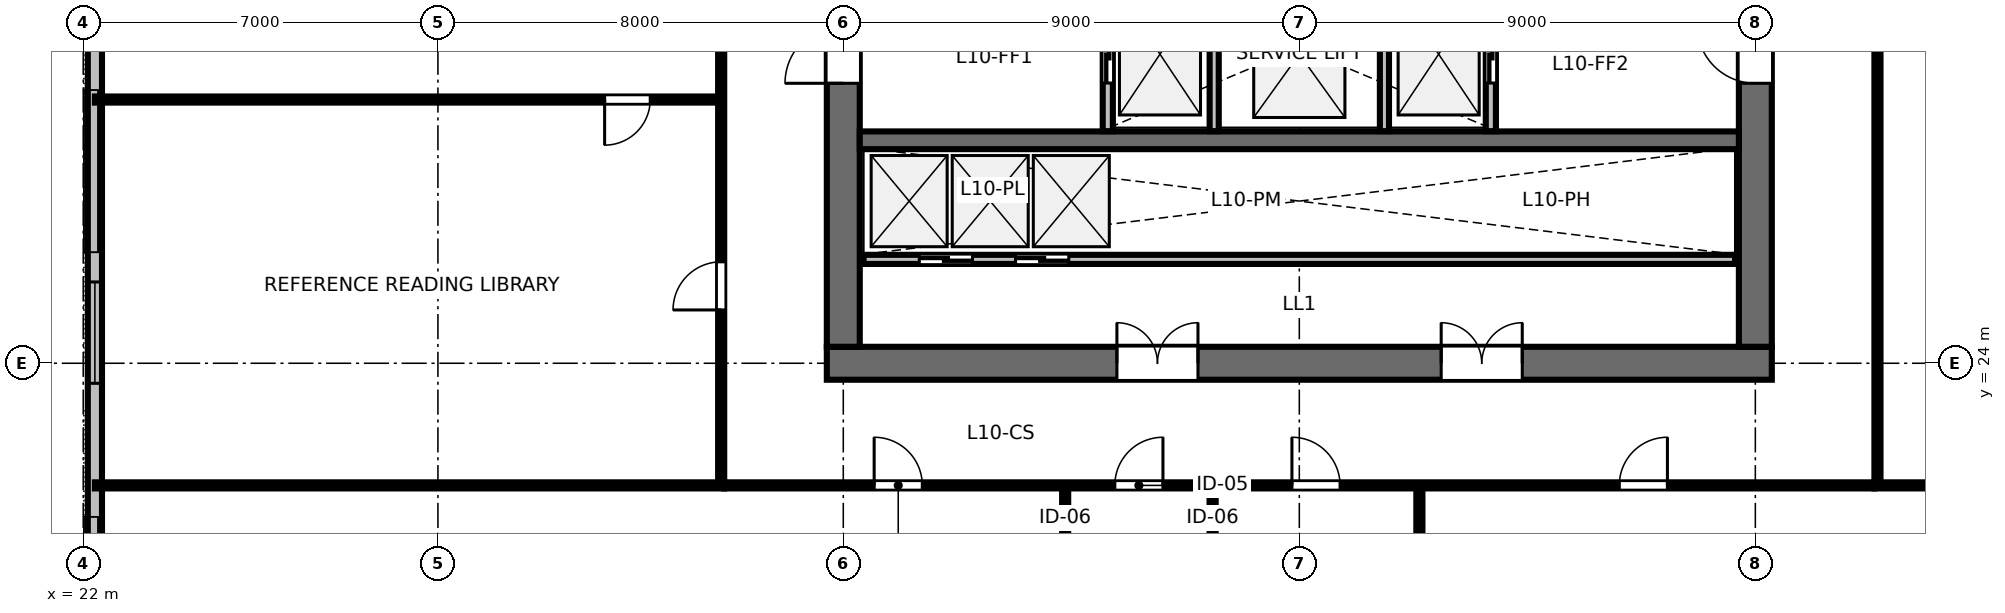
"""IFC4 building model, lengths in metres.
Left out: names, types, materials, properties, quantities, classifications, styles, units other than length and angle.
Written with IfcOpenShell. Run it as: python <this file> out.ifc"""

import sys

from ifc_helpers import new_model, si_unit, direction, frame, frame_2d, origin, place, context, subcontext, project, spatial, rectangle, extrude, element, fill, save


model = new_model("IFC4")
c1 = context("Model", 3, precision=1e-05, world=origin(), true_north=direction((0.0, 1.0)))
c2 = subcontext(c1, "Body", "Model", "MODEL_VIEW")
j1 = project(units=[si_unit("LENGTHUNIT", "METRE"), si_unit("PLANEANGLEUNIT", "RADIAN")], contexts=[c1])
p1 = place(None, origin())
s1 = spatial("IfcSite", under=j1, at=p1, CompositionType="ELEMENT")
p2 = place(p1, origin())
s2 = spatial("IfcBuilding", under=s1, at=p2, CompositionType="ELEMENT")
p3 = place(p2, frame((0.0, 0.0, 42.4)))
s3 = spatial("IfcBuildingStorey", under=s2, at=p3, CompositionType="ELEMENT", Elevation=42.4)
p4 = place(p3, frame((36.675, 24.0, 0.0), z_axis=(0.0, 0.0, 1.0), x_axis=(1.0, 0.0, 0.0)))
e1 = element("IfcWall", 1, at=p4, inside=s3, PredefinedType="SHEAR", context=c2, shape_type="SweptSolid", body=[
    extrude(rectangle(XDim=18.65, YDim=0.65, at=frame_2d((9.325, 0.0))), origin(), (0.0, 0.0, 1.0), 3.36),
])
p5 = place(p4, frame((5.725, 0.0, 0.0)))
e2 = element("IfcOpeningElement", 2, at=p5, cuts=e1, PredefinedType="OPENING", context=c2, shape_type="SweptSolid", body=[
    extrude(rectangle(XDim=1.6, YDim=2.15, at=frame_2d((0.8, 1.075))), frame((0.0, 0.335, 0.0), z_axis=(0.0, -1.0, 0.0), x_axis=(1.0, 0.0, 0.0)), (0.0, 0.0, 1.0), 0.67),
])
p6 = place(p4, frame((12.125, 0.0, 0.0)))
e3 = element("IfcOpeningElement", 3, at=p6, cuts=e1, PredefinedType="OPENING", context=c2, shape_type="SweptSolid", body=[
    extrude(rectangle(XDim=1.6, YDim=2.15, at=frame_2d((0.8, 1.075))), frame((0.0, 0.335, 0.0), z_axis=(0.0, -1.0, 0.0), x_axis=(1.0, 0.0, 0.0)), (0.0, 0.0, 1.0), 0.67),
])
p7 = place(p3, frame((37.0, 24.325, 0.0), z_axis=(0.0, 0.0, 1.0), x_axis=(0.0, 1.0, 0.0)))
e4 = element("IfcWall", 4, at=p7, inside=s3, PredefinedType="SHEAR", context=c2, shape_type="SweptSolid", body=[
    extrude(rectangle(XDim=15.35, YDim=0.65, at=frame_2d((7.675, 0.0))), origin(), (0.0, 0.0, 1.0), 3.36),
])
p8 = place(p7, frame((5.2, 0.0, 0.0)))
e5 = element("IfcOpeningElement", 5, at=p8, cuts=e4, PredefinedType="OPENING", context=c2, shape_type="SweptSolid", body=[
    extrude(rectangle(XDim=1.15, YDim=2.15, at=frame_2d((0.575, 1.075))), frame((0.0, 0.335, 0.0), z_axis=(0.0, -1.0, 0.0), x_axis=(1.0, 0.0, 0.0)), (0.0, 0.0, 1.0), 0.67),
])
p9 = place(p3, frame((55.0, 24.325, 0.0), z_axis=(0.0, 0.0, 1.0), x_axis=(0.0, 1.0, 0.0)))
e6 = element("IfcWall", 6, at=p9, inside=s3, PredefinedType="SHEAR", context=c2, shape_type="SweptSolid", body=[
    extrude(rectangle(XDim=15.35, YDim=0.65, at=frame_2d((7.675, 0.0))), origin(), (0.0, 0.0, 1.0), 3.36),
])
p10 = place(p9, frame((5.2, 0.0, 0.0)))
e7 = element("IfcOpeningElement", 7, at=p10, cuts=e6, PredefinedType="OPENING", context=c2, shape_type="SweptSolid", body=[
    extrude(rectangle(XDim=1.15, YDim=2.15, at=frame_2d((0.575, 1.075))), frame((0.0, 0.335, 0.0), z_axis=(0.0, -1.0, 0.0), x_axis=(1.0, 0.0, 0.0)), (0.0, 0.0, 1.0), 0.67),
])
p11 = place(p3, frame((37.325, 28.4, 0.0), z_axis=(0.0, 0.0, 1.0), x_axis=(1.0, 0.0, 0.0)))
e8 = element("IfcWall", 8, at=p11, inside=s3, PredefinedType="SHEAR", context=c2, shape_type="SweptSolid", body=[
    extrude(rectangle(XDim=17.35, YDim=0.35, at=frame_2d((8.675, 0.0))), origin(), (0.0, 0.0, 1.0), 3.36),
])
p12 = place(p3, frame((22.23, 49.74, 0.0), z_axis=(0.0, 0.0, 1.0), x_axis=(0.0, -1.0, 0.0)))
e9 = element("IfcWall", 9, at=p12, inside=s3, PredefinedType="STANDARD", context=c2, shape_type="SweptSolid", body=[
    extrude(rectangle(XDim=35.48, YDim=0.28, at=frame_2d((17.74, 0.0))), origin(), (0.0, 0.0, 1.0), 3.15),
])
p13 = place(p12, frame((1.949, 0.0, 0.8)))
e10 = element("IfcOpeningElement", 10, at=p13, cuts=e9, PredefinedType="OPENING", context=c2, shape_type="SweptSolid", body=[
    extrude(rectangle(XDim=2.0, YDim=1.95, at=frame_2d((1.0, 0.975))), frame((0.0, 0.15, 0.0), z_axis=(0.0, -1.0, 0.0), x_axis=(1.0, 0.0, 0.0)), (0.0, 0.0, 1.0), 0.3),
])
p14 = place(p12, frame((9.344, 0.0, 0.8)))
e11 = element("IfcOpeningElement", 11, at=p14, cuts=e9, PredefinedType="OPENING", context=c2, shape_type="SweptSolid", body=[
    extrude(rectangle(XDim=2.0, YDim=1.95, at=frame_2d((1.0, 0.975))), frame((0.0, 0.15, 0.0), z_axis=(0.0, -1.0, 0.0), x_axis=(1.0, 0.0, 0.0)), (0.0, 0.0, 1.0), 0.3),
])
p15 = place(p12, frame((24.135, 0.0, 0.8)))
e12 = element("IfcOpeningElement", 12, at=p15, cuts=e9, PredefinedType="OPENING", context=c2, shape_type="SweptSolid", body=[
    extrude(rectangle(XDim=2.0, YDim=1.95, at=frame_2d((1.0, 0.975))), frame((0.0, 0.15, 0.0), z_axis=(0.0, -1.0, 0.0), x_axis=(1.0, 0.0, 0.0)), (0.0, 0.0, 1.0), 0.3),
])
p16 = place(p12, frame((31.531, 0.0, 0.8)))
e13 = element("IfcOpeningElement", 13, at=p16, cuts=e9, PredefinedType="OPENING", context=c2, shape_type="SweptSolid", body=[
    extrude(rectangle(XDim=2.0, YDim=1.95, at=frame_2d((1.0, 0.975))), frame((0.0, 0.15, 0.0), z_axis=(0.0, -1.0, 0.0), x_axis=(1.0, 0.0, 0.0)), (0.0, 0.0, 1.0), 0.3),
])
p17 = place(p3, frame((42.22, 28.58, 0.0), z_axis=(0.0, 0.0, 1.0), x_axis=(0.0, 1.0, 0.0)))
e14 = element("IfcWall", 14, at=p17, inside=s3, PredefinedType="PARTITIONING", context=c2, shape_type="SweptSolid", body=[
    extrude(rectangle(XDim=3.04, YDim=0.2, at=frame_2d((1.52, 0.0))), origin(), (0.0, 0.0, 1.0), 3.15),
])
p18 = place(p17, frame((0.95, 0.0, 0.0)))
e15 = element("IfcOpeningElement", 15, at=p18, cuts=e14, PredefinedType="OPENING", context=c2, shape_type="SweptSolid", body=[
    extrude(rectangle(XDim=1.05, YDim=2.15, at=frame_2d((0.525, 1.075))), frame((0.0, 0.11, 0.0), z_axis=(0.0, -1.0, 0.0), x_axis=(1.0, 0.0, 0.0)), (0.0, 0.0, 1.0), 0.22),
])
p19 = place(p3, frame((49.78, 28.58, 0.0), z_axis=(0.0, 0.0, 1.0), x_axis=(0.0, 1.0, 0.0)))
e16 = element("IfcWall", 16, at=p19, inside=s3, PredefinedType="PARTITIONING", context=c2, shape_type="SweptSolid", body=[
    extrude(rectangle(XDim=3.04, YDim=0.2, at=frame_2d((1.52, 0.0))), origin(), (0.0, 0.0, 1.0), 3.15),
])
p20 = place(p19, frame((0.95, 0.0, 0.0)))
e17 = element("IfcOpeningElement", 17, at=p20, cuts=e16, PredefinedType="OPENING", context=c2, shape_type="SweptSolid", body=[
    extrude(rectangle(XDim=1.05, YDim=2.15, at=frame_2d((0.525, 1.075))), frame((0.0, 0.11, 0.0), z_axis=(0.0, -1.0, 0.0), x_axis=(1.0, 0.0, 0.0)), (0.0, 0.0, 1.0), 0.22),
])
for number, where, z_axis, x_axis in (
    (18, (44.32, 28.58, 0.0), (0.0, 0.0, 1.0), (0.0, 1.0, 0.0)),
    (19, (47.68, 28.58, 0.0), (0.0, 0.0, 1.0), (0.0, 1.0, 0.0)),
):
    element("IfcWall", number, at=place(p3, frame(where, z_axis=z_axis, x_axis=x_axis)), inside=s3, PredefinedType="PARTITIONING", context=c2, shape_type="SweptSolid", body=[
        extrude(rectangle(XDim=3.04, YDim=0.18, at=frame_2d((1.52, 0.0))), origin(), (0.0, 0.0, 1.0), 3.15),
    ])
p21 = place(p3, frame((37.4, 26.05, 0.0), z_axis=(0.0, 0.0, 1.0), x_axis=(1.0, 0.0, 0.0)))
e20 = element("IfcWall", 20, at=p21, inside=s3, PredefinedType="PARTITIONING", context=c2, shape_type="SweptSolid", body=[
    extrude(rectangle(XDim=17.2, YDim=0.18, at=frame_2d((8.6, 0.0))), origin(), (0.0, 0.0, 1.0), 3.15),
])
p22 = place(p21, frame((1.1, 0.0, 0.0)))
e21 = element("IfcOpeningElement", 21, at=p22, cuts=e20, PredefinedType="OPENING", context=c2, shape_type="SweptSolid", body=[
    extrude(rectangle(XDim=1.05, YDim=2.15, at=frame_2d((0.525, 1.075))), frame((0.0, 0.1, 0.0), z_axis=(0.0, -1.0, 0.0), x_axis=(1.0, 0.0, 0.0)), (0.0, 0.0, 1.0), 0.2),
])
p23 = place(p21, frame((3.0, 0.0, 0.0)))
e22 = element("IfcOpeningElement", 22, at=p23, cuts=e20, PredefinedType="OPENING", context=c2, shape_type="SweptSolid", body=[
    extrude(rectangle(XDim=1.05, YDim=2.15, at=frame_2d((0.525, 1.075))), frame((0.0, 0.1, 0.0), z_axis=(0.0, -1.0, 0.0), x_axis=(1.0, 0.0, 0.0)), (0.0, 0.0, 1.0), 0.2),
])
p24 = place(p3, frame((41.379, 21.59, 0.0), z_axis=(0.0, 0.0, 1.0), x_axis=(0.0, -1.0, 0.0)))
e23 = element("IfcWall", 23, at=p24, inside=s3, PredefinedType="PARTITIONING", context=c2, shape_type="SweptSolid", body=[
    extrude(rectangle(XDim=10.51, YDim=0.12, at=frame_2d((5.255, 0.0))), origin(), (0.0, 0.0, 1.0), 2.43),
])
p25 = place(p24, frame((1.4, 0.0, 0.0)))
e24 = element("IfcOpeningElement", 24, at=p25, cuts=e23, PredefinedType="OPENING", context=c2, shape_type="SweptSolid", body=[
    extrude(rectangle(XDim=0.9, YDim=2.15, at=frame_2d((0.45, 1.075))), frame((0.0, 0.07, 0.0), z_axis=(0.0, -1.0, 0.0), x_axis=(1.0, 0.0, 0.0)), (0.0, 0.0, 1.0), 0.14),
])
p26 = place(p3, frame((44.289, 21.59, 0.0), z_axis=(0.0, 0.0, 1.0), x_axis=(0.0, -1.0, 0.0)))
e25 = element("IfcWall", 25, at=p26, inside=s3, PredefinedType="PARTITIONING", context=c2, shape_type="SweptSolid", body=[
    extrude(rectangle(XDim=10.51, YDim=0.12, at=frame_2d((5.255, 0.0))), origin(), (0.0, 0.0, 1.0), 2.43),
])
p27 = place(p26, frame((1.4, 0.0, 0.0)))
e26 = element("IfcOpeningElement", 26, at=p27, cuts=e25, PredefinedType="OPENING", context=c2, shape_type="SweptSolid", body=[
    extrude(rectangle(XDim=0.9, YDim=2.15, at=frame_2d((0.45, 1.075))), frame((0.0, 0.07, 0.0), z_axis=(0.0, -1.0, 0.0), x_axis=(1.0, 0.0, 0.0)), (0.0, 0.0, 1.0), 0.14),
])
p28 = place(p3, frame((48.37, 21.59, 0.0), z_axis=(0.0, 0.0, 1.0), x_axis=(0.0, -1.0, 0.0)))
e27 = element("IfcWall", 27, at=p28, inside=s3, PredefinedType="PARTITIONING", context=c2, shape_type="SweptSolid", body=[
    extrude(rectangle(XDim=10.51, YDim=0.12, at=frame_2d((5.255, 0.0))), origin(), (0.0, 0.0, 1.0), 2.43),
])
p29 = place(p28, frame((1.4, 0.0, 0.0)))
e28 = element("IfcOpeningElement", 28, at=p29, cuts=e27, PredefinedType="OPENING", context=c2, shape_type="SweptSolid", body=[
    extrude(rectangle(XDim=0.9, YDim=2.15, at=frame_2d((0.45, 1.075))), frame((0.0, 0.07, 0.0), z_axis=(0.0, -1.0, 0.0), x_axis=(1.0, 0.0, 0.0)), (0.0, 0.0, 1.0), 0.14),
])
p30 = place(p3, frame((34.65, 21.59, 0.0), z_axis=(0.0, 0.0, 1.0), x_axis=(1.0, 0.0, 0.0)))
e29 = element("IfcWall", 29, at=p30, inside=s3, PredefinedType="PARTITIONING", context=c2, shape_type="SweptSolid", body=[
    extrude(rectangle(XDim=22.7, YDim=0.12, at=frame_2d((11.35, 0.0))), origin(), (0.0, 0.0, 1.0), 2.43),
])
p31 = place(p30, frame((2.959, 0.0, 0.0)))
e30 = element("IfcOpeningElement", 30, at=p31, cuts=e29, PredefinedType="OPENING", context=c2, shape_type="SweptSolid", body=[
    extrude(rectangle(XDim=0.95, YDim=2.15, at=frame_2d((0.475, 1.075))), frame((0.0, 0.07, 0.0), z_axis=(0.0, -1.0, 0.0), x_axis=(1.0, 0.0, 0.0)), (0.0, 0.0, 1.0), 0.14),
])
p32 = place(p30, frame((7.709, 0.0, 0.0)))
e31 = element("IfcOpeningElement", 31, at=p32, cuts=e29, PredefinedType="OPENING", context=c2, shape_type="SweptSolid", body=[
    extrude(rectangle(XDim=0.95, YDim=2.15, at=frame_2d((0.475, 1.075))), frame((0.0, 0.07, 0.0), z_axis=(0.0, -1.0, 0.0), x_axis=(1.0, 0.0, 0.0)), (0.0, 0.0, 1.0), 0.14),
])
p33 = place(p30, frame((11.204, 0.0, 0.0)))
e32 = element("IfcOpeningElement", 32, at=p33, cuts=e29, PredefinedType="OPENING", context=c2, shape_type="SweptSolid", body=[
    extrude(rectangle(XDim=0.95, YDim=2.15, at=frame_2d((0.475, 1.075))), frame((0.0, 0.07, 0.0), z_axis=(0.0, -1.0, 0.0), x_axis=(1.0, 0.0, 0.0)), (0.0, 0.0, 1.0), 0.14),
])
p34 = place(p30, frame((17.665, 0.0, 0.0)))
e33 = element("IfcOpeningElement", 33, at=p34, cuts=e29, PredefinedType="OPENING", context=c2, shape_type="SweptSolid", body=[
    extrude(rectangle(XDim=0.95, YDim=2.15, at=frame_2d((0.475, 1.075))), frame((0.0, 0.07, 0.0), z_axis=(0.0, -1.0, 0.0), x_axis=(1.0, 0.0, 0.0)), (0.0, 0.0, 1.0), 0.14),
])
p35 = place(p3, frame((34.59, 29.204, 0.0), z_axis=(0.0, 0.0, 1.0), x_axis=(-1.0, 0.0, 0.0)))
e34 = element("IfcWall", 34, at=p35, inside=s3, PredefinedType="PARTITIONING", context=c2, shape_type="SweptSolid", body=[
    extrude(rectangle(XDim=12.36, YDim=0.12, at=frame_2d((6.18, 0.0))), origin(), (0.0, 0.0, 1.0), 2.43),
])
p36 = place(p35, frame((1.4, 0.0, 0.0)))
e35 = element("IfcOpeningElement", 35, at=p36, cuts=e34, PredefinedType="OPENING", context=c2, shape_type="SweptSolid", body=[
    extrude(rectangle(XDim=0.9, YDim=2.15, at=frame_2d((0.45, 1.075))), frame((0.0, 0.07, 0.0), z_axis=(0.0, -1.0, 0.0), x_axis=(1.0, 0.0, 0.0)), (0.0, 0.0, 1.0), 0.14),
])
p37 = place(p3, frame((34.59, 21.65, 0.0), z_axis=(0.0, 0.0, 1.0), x_axis=(0.0, 1.0, 0.0)))
e36 = element("IfcWall", 36, at=p37, inside=s3, PredefinedType="PARTITIONING", context=c2, shape_type="SweptSolid", body=[
    extrude(rectangle(XDim=20.7, YDim=0.12, at=frame_2d((10.35, 0.0))), origin(), (0.0, 0.0, 1.0), 2.43),
])
p38 = place(p37, frame((3.402, 0.0, 0.0)))
e37 = element("IfcOpeningElement", 37, at=p38, cuts=e36, PredefinedType="OPENING", context=c2, shape_type="SweptSolid", body=[
    extrude(rectangle(XDim=0.95, YDim=2.15, at=frame_2d((0.475, 1.075))), frame((0.0, 0.07, 0.0), z_axis=(0.0, -1.0, 0.0), x_axis=(1.0, 0.0, 0.0)), (0.0, 0.0, 1.0), 0.14),
])
p39 = place(p37, frame((9.912, 0.0, 0.0)))
e38 = element("IfcOpeningElement", 38, at=p39, cuts=e36, PredefinedType="OPENING", context=c2, shape_type="SweptSolid", body=[
    extrude(rectangle(XDim=0.95, YDim=2.15, at=frame_2d((0.475, 1.075))), frame((0.0, 0.07, 0.0), z_axis=(0.0, -1.0, 0.0), x_axis=(1.0, 0.0, 0.0)), (0.0, 0.0, 1.0), 0.14),
])
p40 = place(p37, frame((16.385, 0.0, 0.0)))
e39 = element("IfcOpeningElement", 39, at=p40, cuts=e36, PredefinedType="OPENING", context=c2, shape_type="SweptSolid", body=[
    extrude(rectangle(XDim=0.95, YDim=2.15, at=frame_2d((0.475, 1.075))), frame((0.0, 0.07, 0.0), z_axis=(0.0, -1.0, 0.0), x_axis=(1.0, 0.0, 0.0)), (0.0, 0.0, 1.0), 0.14),
])
p41 = place(p3, frame((57.41, 21.65, 0.0), z_axis=(0.0, 0.0, 1.0), x_axis=(0.0, 1.0, 0.0)))
e40 = element("IfcWall", 40, at=p41, inside=s3, PredefinedType="PARTITIONING", context=c2, shape_type="SweptSolid", body=[
    extrude(rectangle(XDim=20.7, YDim=0.12, at=frame_2d((10.35, 0.0))), origin(), (0.0, 0.0, 1.0), 2.43),
])
p42 = place(p41, frame((9.875, 0.0, 0.0)))
e41 = element("IfcOpeningElement", 41, at=p42, cuts=e40, PredefinedType="OPENING", context=c2, shape_type="SweptSolid", body=[
    extrude(rectangle(XDim=0.95, YDim=2.15, at=frame_2d((0.475, 1.075))), frame((0.0, 0.07, 0.0), z_axis=(0.0, -1.0, 0.0), x_axis=(1.0, 0.0, 0.0)), (0.0, 0.0, 1.0), 0.14),
])
for number, where, z_axis, x_axis in (
    (42, (34.65, 21.59, 0.0), (0.0, 0.0, 1.0), (-1.0, 0.0, 0.0)),
    (43, (57.35, 21.59, 0.0), (0.0, 0.0, 1.0), (1.0, 0.0, 0.0)),
):
    element("IfcWall", number, at=place(p3, frame(where, z_axis=z_axis, x_axis=x_axis)), inside=s3, PredefinedType="PARTITIONING", context=c2, shape_type="SweptSolid", body=[
        extrude(rectangle(XDim=12.42, YDim=0.12, at=frame_2d((6.21, 0.0))), origin(), (0.0, 0.0, 1.0), 2.43),
    ])
p43 = place(p15, origin())
e44 = element("IfcWindow", 44, at=p43, inside=s3, PartitioningType="SINGLE_PANEL", PredefinedType="WINDOW", context=c2, shape_type="SweptSolid", body=[
    extrude(rectangle(XDim=2.0, YDim=1.95, at=frame_2d((1.0, 0.975))), frame((0.0, 0.03, 0.0), z_axis=(0.0, -1.0, 0.0), x_axis=(1.0, 0.0, 0.0)), (0.0, 0.0, 1.0), 0.06),
])
fill(e12, e44)
p44 = place(p8, origin())
e45 = element("IfcDoor", 45, at=p44, inside=s3, OperationType="SINGLE_SWING_LEFT", PredefinedType="DOOR", context=c2, shape_type="SweptSolid", body=[
    extrude(rectangle(XDim=1.15, YDim=2.15, at=frame_2d((0.575, 1.075))), frame((0.0, 0.025, 0.0), z_axis=(0.0, -1.0, 0.0), x_axis=(1.0, 0.0, 0.0)), (0.0, 0.0, 1.0), 0.05),
])
fill(e5, e45)
p45 = place(p10, origin())
e46 = element("IfcDoor", 46, at=p45, inside=s3, OperationType="SINGLE_SWING_RIGHT", PredefinedType="DOOR", context=c2, shape_type="SweptSolid", body=[
    extrude(rectangle(XDim=1.15, YDim=2.15, at=frame_2d((0.575, 1.075))), frame((0.0, 0.025, 0.0), z_axis=(0.0, -1.0, 0.0), x_axis=(1.0, 0.0, 0.0)), (0.0, 0.0, 1.0), 0.05),
])
fill(e7, e46)
p46 = place(p5, origin())
e47 = element("IfcDoor", 47, at=p46, inside=s3, OperationType="DOUBLE_DOOR_SINGLE_SWING", PredefinedType="DOOR", context=c2, shape_type="SweptSolid", body=[
    extrude(rectangle(XDim=1.6, YDim=2.15, at=frame_2d((0.8, 1.075))), frame((0.0, 0.025, 0.0), z_axis=(0.0, -1.0, 0.0), x_axis=(1.0, 0.0, 0.0)), (0.0, 0.0, 1.0), 0.05),
])
fill(e2, e47)
p47 = place(p6, origin())
e48 = element("IfcDoor", 48, at=p47, inside=s3, OperationType="DOUBLE_DOOR_SINGLE_SWING", PredefinedType="DOOR", context=c2, shape_type="SweptSolid", body=[
    extrude(rectangle(XDim=1.6, YDim=2.15, at=frame_2d((0.8, 1.075))), frame((0.0, 0.025, 0.0), z_axis=(0.0, -1.0, 0.0), x_axis=(1.0, 0.0, 0.0)), (0.0, 0.0, 1.0), 0.05),
])
fill(e3, e48)
p48 = place(p18, origin())
e49 = element("IfcDoor", 49, at=p48, inside=s3, OperationType="SLIDING_TO_LEFT", PredefinedType="DOOR", context=c2, shape_type="SweptSolid", body=[
    extrude(rectangle(XDim=1.05, YDim=2.15, at=frame_2d((0.525, 1.075))), frame((0.0, 0.025, 0.0), z_axis=(0.0, -1.0, 0.0), x_axis=(1.0, 0.0, 0.0)), (0.0, 0.0, 1.0), 0.05),
])
fill(e15, e49)
p49 = place(p20, origin())
e50 = element("IfcDoor", 50, at=p49, inside=s3, OperationType="SLIDING_TO_RIGHT", PredefinedType="DOOR", context=c2, shape_type="SweptSolid", body=[
    extrude(rectangle(XDim=1.05, YDim=2.15, at=frame_2d((0.525, 1.075))), frame((0.0, 0.025, 0.0), z_axis=(0.0, -1.0, 0.0), x_axis=(1.0, 0.0, 0.0)), (0.0, 0.0, 1.0), 0.05),
])
fill(e17, e50)
p50 = place(p22, origin())
e51 = element("IfcDoor", 51, at=p50, inside=s3, OperationType="SLIDING_TO_LEFT", PredefinedType="DOOR", context=c2, shape_type="SweptSolid", body=[
    extrude(rectangle(XDim=1.05, YDim=2.15, at=frame_2d((0.525, 1.075))), frame((0.0, 0.025, 0.0), z_axis=(0.0, -1.0, 0.0), x_axis=(1.0, 0.0, 0.0)), (0.0, 0.0, 1.0), 0.05),
])
fill(e21, e51)
p51 = place(p23, origin())
e52 = element("IfcDoor", 52, at=p51, inside=s3, OperationType="SLIDING_TO_RIGHT", PredefinedType="DOOR", context=c2, shape_type="SweptSolid", body=[
    extrude(rectangle(XDim=1.05, YDim=2.15, at=frame_2d((0.525, 1.075))), frame((0.0, 0.025, 0.0), z_axis=(0.0, -1.0, 0.0), x_axis=(1.0, 0.0, 0.0)), (0.0, 0.0, 1.0), 0.05),
])
fill(e22, e52)
p52 = place(p31, origin())
e53 = element("IfcDoor", 53, at=p52, inside=s3, OperationType="SINGLE_SWING_LEFT", PredefinedType="DOOR", context=c2, shape_type="SweptSolid", body=[
    extrude(rectangle(XDim=0.95, YDim=2.15, at=frame_2d((0.475, 1.075))), frame((0.0, 0.025, 0.0), z_axis=(0.0, -1.0, 0.0), x_axis=(1.0, 0.0, 0.0)), (0.0, 0.0, 1.0), 0.05),
])
fill(e30, e53)
p53 = place(p32, origin())
e54 = element("IfcDoor", 54, at=p53, inside=s3, OperationType="SINGLE_SWING_RIGHT", PredefinedType="DOOR", context=c2, shape_type="SweptSolid", body=[
    extrude(rectangle(XDim=0.95, YDim=2.15, at=frame_2d((0.475, 1.075))), frame((0.0, 0.025, 0.0), z_axis=(0.0, -1.0, 0.0), x_axis=(1.0, 0.0, 0.0)), (0.0, 0.0, 1.0), 0.05),
])
fill(e31, e54)
p54 = place(p33, origin())
e55 = element("IfcDoor", 55, at=p54, inside=s3, OperationType="SINGLE_SWING_LEFT", PredefinedType="DOOR", context=c2, shape_type="SweptSolid", body=[
    extrude(rectangle(XDim=0.95, YDim=2.15, at=frame_2d((0.475, 1.075))), frame((0.0, 0.025, 0.0), z_axis=(0.0, -1.0, 0.0), x_axis=(1.0, 0.0, 0.0)), (0.0, 0.0, 1.0), 0.05),
])
fill(e32, e55)
p55 = place(p34, origin())
e56 = element("IfcDoor", 56, at=p55, inside=s3, OperationType="SINGLE_SWING_RIGHT", PredefinedType="DOOR", context=c2, shape_type="SweptSolid", body=[
    extrude(rectangle(XDim=0.95, YDim=2.15, at=frame_2d((0.475, 1.075))), frame((0.0, 0.025, 0.0), z_axis=(0.0, -1.0, 0.0), x_axis=(1.0, 0.0, 0.0)), (0.0, 0.0, 1.0), 0.05),
])
fill(e33, e56)
p56 = place(p36, origin())
e57 = element("IfcDoor", 57, at=p56, inside=s3, OperationType="SINGLE_SWING_RIGHT", PredefinedType="DOOR", context=c2, shape_type="SweptSolid", body=[
    extrude(rectangle(XDim=0.9, YDim=2.15, at=frame_2d((0.45, 1.075))), frame((0.0, 0.025, 0.0), z_axis=(0.0, -1.0, 0.0), x_axis=(1.0, 0.0, 0.0)), (0.0, 0.0, 1.0), 0.05),
])
fill(e35, e57)
p57 = place(p38, origin())
e58 = element("IfcDoor", 58, at=p57, inside=s3, OperationType="SINGLE_SWING_LEFT", PredefinedType="DOOR", context=c2, shape_type="SweptSolid", body=[
    extrude(rectangle(XDim=0.95, YDim=2.15, at=frame_2d((0.475, 1.075))), frame((0.0, 0.025, 0.0), z_axis=(0.0, -1.0, 0.0), x_axis=(1.0, 0.0, 0.0)), (0.0, 0.0, 1.0), 0.05),
])
fill(e37, e58)
save(model, sys.argv[1])
